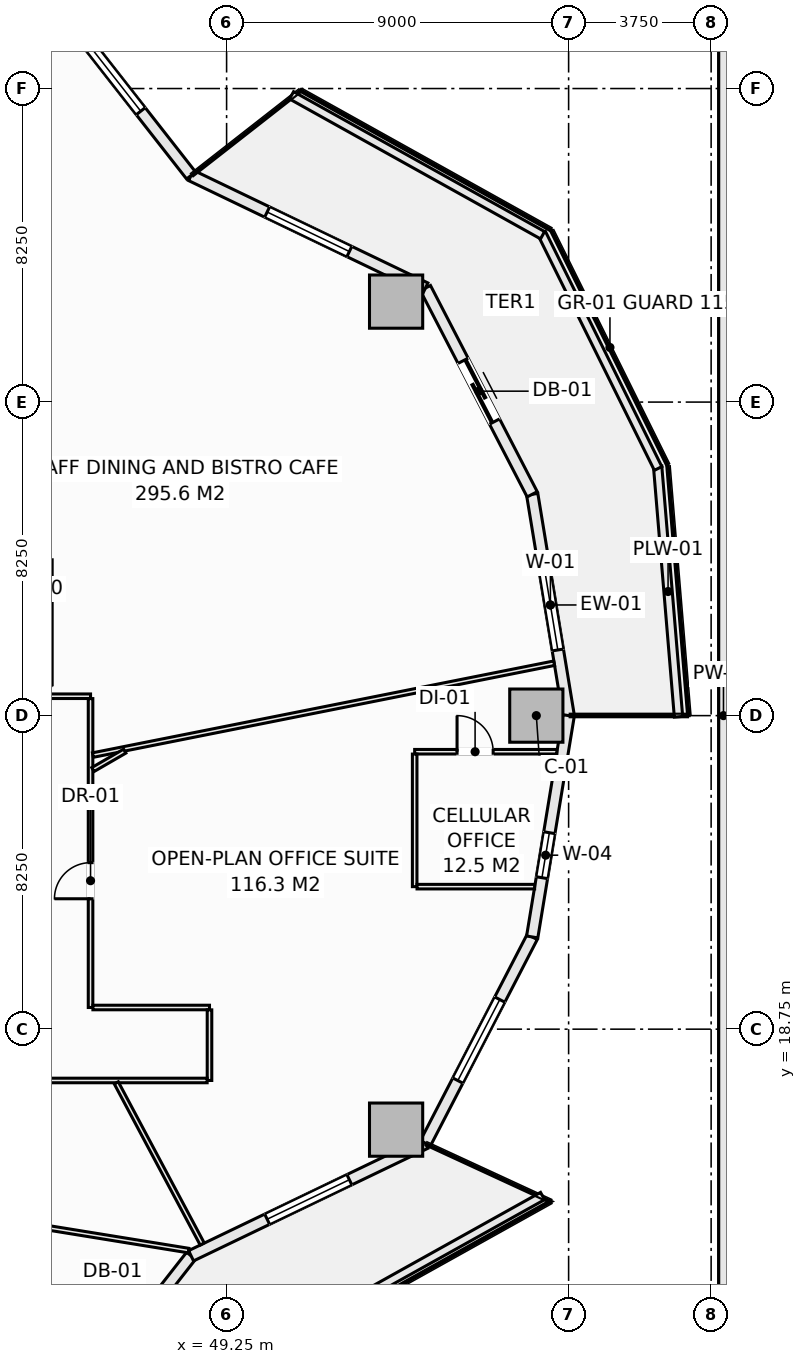
"""IFC4 building model, lengths in metres.
Left out: names, types, materials, properties, quantities, classifications, styles, units other than length and angle.
Written with IfcOpenShell. Run it as: python <this file> out.ifc"""

import sys

from ifc_helpers import new_model, si_unit, direction, frame, frame_2d, origin, origin_2d, place, context, subcontext, project, spatial, rectangle, extrude, element, fill, save


model = new_model("IFC4")
c1 = context("Model", 3, precision=1e-05, world=origin(), true_north=direction((0.0, 1.0)))
c2 = subcontext(c1, "Body", "Model", "MODEL_VIEW")
j1 = project(units=[si_unit("LENGTHUNIT", "METRE"), si_unit("PLANEANGLEUNIT", "RADIAN")], contexts=[c1])
p1 = place(None, origin())
s1 = spatial("IfcSite", under=j1, at=p1, CompositionType="ELEMENT")
p2 = place(p1, origin())
s2 = spatial("IfcBuilding", under=s1, at=p2, CompositionType="ELEMENT")
p3 = place(p2, frame((0.0, 0.0, 26.5)))
s3 = spatial("IfcBuildingStorey", under=s2, at=p3, CompositionType="ELEMENT", Elevation=26.5)
for number, where, z_axis, x_axis in (
    (1, (57.4, 27.0, -0.28), (0.0, 0.0, 1.0), (1.0, 0.0, 0.0)),
    (2, (53.71, 37.894, -0.28), (0.0, 0.0, 1.0), (1.0, 0.0, 0.0)),
    (3, (53.71, 16.106, -0.28), (0.0, 0.0, 1.0), (1.0, 0.0, 0.0)),
):
    element("IfcColumn", number, at=place(p3, frame(where, z_axis=z_axis, x_axis=x_axis)), inside=s3, PredefinedType="COLUMN", context=c2, shape_type="SweptSolid", body=[
        extrude(rectangle(XDim=1.4, YDim=1.4, at=origin_2d()), origin(), (0.0, 0.0, 1.0), 3.85),
    ])
p4 = place(p3, frame((57.292, 32.823, 0.0), z_axis=(0.0, 0.0, 1.0), x_axis=(0.162366057843, -0.98673059305, 0.0)))
e4 = element("IfcWall", 4, at=p4, inside=s3, PredefinedType="SOLIDWALL", context=c2, shape_type="SweptSolid", body=[
    extrude(rectangle(XDim=5.902, YDim=0.3, at=frame_2d((2.951, 0.0))), origin(), (0.0, 0.0, 1.0), 3.093),
])
p5 = place(p4, frame((1.751, 0.0, 0.85)))
e5 = element("IfcOpeningElement", 5, at=p5, cuts=e4, PredefinedType="OPENING", context=c2, shape_type="SweptSolid", body=[
    extrude(rectangle(XDim=2.4, YDim=1.9, at=frame_2d((1.2, 0.95))), frame((0.0, 0.16, 0.0), z_axis=(0.0, -1.0, 0.0), x_axis=(1.0, 0.0, 0.0)), (0.0, 0.0, 1.0), 0.32),
])
p6 = place(p3, frame((54.482, 38.25, 0.0), z_axis=(0.0, 0.0, 1.0), x_axis=(0.459809804413, -0.88801742312, 0.0)))
e6 = element("IfcWall", 6, at=p6, inside=s3, PredefinedType="SOLIDWALL", context=c2, shape_type="SweptSolid", body=[
    extrude(rectangle(XDim=6.111, YDim=0.3, at=frame_2d((3.055, 0.0))), origin(), (0.0, 0.0, 1.0), 3.093),
])
p7 = place(p6, frame((2.155, 0.0, 0.0)))
e7 = element("IfcOpeningElement", 7, at=p7, cuts=e6, PredefinedType="OPENING", context=c2, shape_type="SweptSolid", body=[
    extrude(rectangle(XDim=1.8, YDim=2.25, at=frame_2d((0.9, 1.125))), frame((0.0, 0.16, 0.0), z_axis=(0.0, -1.0, 0.0), x_axis=(1.0, 0.0, 0.0)), (0.0, 0.0, 1.0), 0.32),
])
p8 = place(p3, frame((48.315, 41.213, 0.0), z_axis=(0.0, 0.0, 1.0), x_axis=(0.901360393999, -0.433069786673, 0.0)))
e8 = element("IfcWall", 8, at=p8, inside=s3, PredefinedType="SOLIDWALL", context=c2, shape_type="SweptSolid", body=[
    extrude(rectangle(XDim=6.842, YDim=0.3, at=frame_2d((3.421, 0.0))), origin(), (0.0, 0.0, 1.0), 3.093),
])
p9 = place(p8, frame((2.221, 0.0, 0.85)))
e9 = element("IfcOpeningElement", 9, at=p9, cuts=e8, PredefinedType="OPENING", context=c2, shape_type="SweptSolid", body=[
    extrude(rectangle(XDim=2.4, YDim=1.9, at=frame_2d((1.2, 0.95))), frame((0.0, 0.16, 0.0), z_axis=(0.0, -1.0, 0.0), x_axis=(1.0, 0.0, 0.0)), (0.0, 0.0, 1.0), 0.32),
])
p10 = place(p3, frame((44.188, 46.486, 0.0), z_axis=(0.0, 0.0, 1.0), x_axis=(0.616421309777, -0.787416515482, 0.0)))
e10 = element("IfcWall", 10, at=p10, inside=s3, PredefinedType="SOLIDWALL", context=c2, shape_type="SweptSolid", body=[
    extrude(rectangle(XDim=6.696, YDim=0.3, at=frame_2d((3.348, 0.0))), origin(), (0.0, 0.0, 1.0), 3.093),
])
p11 = place(p10, frame((2.148, 0.0, 0.85)))
e11 = element("IfcOpeningElement", 11, at=p11, cuts=e10, PredefinedType="OPENING", context=c2, shape_type="SweptSolid", body=[
    extrude(rectangle(XDim=2.4, YDim=1.9, at=frame_2d((1.2, 0.95))), frame((0.0, 0.16, 0.0), z_axis=(0.0, -1.0, 0.0), x_axis=(1.0, 0.0, 0.0)), (0.0, 0.0, 1.0), 0.32),
])
p12 = place(p3, frame((44.188, 7.514, 0.0), z_axis=(0.0, 0.0, 1.0), x_axis=(0.616421309777, 0.787416515482, 0.0)))
e12 = element("IfcWall", 12, at=p12, inside=s3, PredefinedType="SOLIDWALL", context=c2, shape_type="SweptSolid", body=[
    extrude(rectangle(XDim=6.696, YDim=0.3, at=frame_2d((3.348, 0.0))), origin(), (0.0, 0.0, 1.0), 3.093),
])
p13 = place(p12, frame((2.448, 0.0, 0.0)))
e13 = element("IfcOpeningElement", 13, at=p13, cuts=e12, PredefinedType="OPENING", context=c2, shape_type="SweptSolid", body=[
    extrude(rectangle(XDim=1.8, YDim=2.25, at=frame_2d((0.9, 1.125))), frame((0.0, 0.16, 0.0), z_axis=(0.0, -1.0, 0.0), x_axis=(1.0, 0.0, 0.0)), (0.0, 0.0, 1.0), 0.32),
])
p14 = place(p3, frame((48.315, 12.787, 0.0), z_axis=(0.0, 0.0, 1.0), x_axis=(0.901360393999, 0.433069786673, 0.0)))
e14 = element("IfcWall", 14, at=p14, inside=s3, PredefinedType="SOLIDWALL", context=c2, shape_type="SweptSolid", body=[
    extrude(rectangle(XDim=6.842, YDim=0.3, at=frame_2d((3.421, 0.0))), origin(), (0.0, 0.0, 1.0), 3.093),
])
p15 = place(p14, frame((2.221, 0.0, 0.85)))
e15 = element("IfcOpeningElement", 15, at=p15, cuts=e14, PredefinedType="OPENING", context=c2, shape_type="SweptSolid", body=[
    extrude(rectangle(XDim=2.4, YDim=1.9, at=frame_2d((1.2, 0.95))), frame((0.0, 0.16, 0.0), z_axis=(0.0, -1.0, 0.0), x_axis=(1.0, 0.0, 0.0)), (0.0, 0.0, 1.0), 0.32),
])
p16 = place(p3, frame((54.482, 15.75, 0.0), z_axis=(0.0, 0.0, 1.0), x_axis=(0.459809804413, 0.88801742312, 0.0)))
e16 = element("IfcWall", 16, at=p16, inside=s3, PredefinedType="SOLIDWALL", context=c2, shape_type="SweptSolid", body=[
    extrude(rectangle(XDim=6.111, YDim=0.3, at=frame_2d((3.055, 0.0))), origin(), (0.0, 0.0, 1.0), 3.093),
])
p17 = place(p16, frame((1.855, 0.0, 0.85)))
e17 = element("IfcOpeningElement", 17, at=p17, cuts=e16, PredefinedType="OPENING", context=c2, shape_type="SweptSolid", body=[
    extrude(rectangle(XDim=2.4, YDim=1.9, at=frame_2d((1.2, 0.95))), frame((0.0, 0.16, 0.0), z_axis=(0.0, -1.0, 0.0), x_axis=(1.0, 0.0, 0.0)), (0.0, 0.0, 1.0), 0.32),
])
p18 = place(p3, frame((57.292, 21.177, 0.0), z_axis=(0.0, 0.0, 1.0), x_axis=(0.162366057843, 0.98673059305, 0.0)))
e18 = element("IfcWall", 18, at=p18, inside=s3, PredefinedType="SOLIDWALL", context=c2, shape_type="SweptSolid", body=[
    extrude(rectangle(XDim=5.902, YDim=0.3, at=frame_2d((2.951, 0.0))), origin(), (0.0, 0.0, 1.0), 3.093),
])
p19 = place(p18, frame((1.58, 0.0, 0.72)))
e19 = element("IfcOpeningElement", 19, at=p19, cuts=e18, PredefinedType="OPENING", context=c2, shape_type="SweptSolid", body=[
    extrude(rectangle(XDim=1.2, YDim=1.65, at=frame_2d((0.6, 0.825))), frame((0.0, 0.16, 0.0), z_axis=(0.0, -1.0, 0.0), x_axis=(1.0, 0.0, 0.0)), (0.0, 0.0, 1.0), 0.32),
])
p20 = place(p3, frame((60.592, 33.561, 0.0), z_axis=(0.0, 0.0, 1.0), x_axis=(0.08310047353, -0.996541173911, 0.0)))
e20 = element("IfcWall", 20, at=p20, inside=s3, PredefinedType="PARAPET", context=c2, shape_type="SweptSolid", body=[
    extrude(rectangle(XDim=6.613, YDim=0.22, at=frame_2d((3.307, 0.0))), origin(), (0.0, 0.0, 1.0), 0.52),
])
p21 = place(p3, frame((57.539, 39.697, 0.0), z_axis=(0.0, 0.0, 1.0), x_axis=(0.443578479433, -0.8962355341, 0.0)))
e21 = element("IfcWall", 21, at=p21, inside=s3, PredefinedType="PARAPET", context=c2, shape_type="SweptSolid", body=[
    extrude(rectangle(XDim=6.911, YDim=0.22, at=frame_2d((3.456, 0.0))), origin(), (0.0, 0.0, 1.0), 0.52),
])
for number, where, z_axis, x_axis in (
    (22, (50.959, 43.322, 0.0), (0.0, 0.0, 1.0), (0.874, -0.487, 0.0)),
    (23, (50.959, 10.678, 0.0), (0.0, 0.0, 1.0), (0.874, 0.487, 0.0)),
):
    element("IfcWall", number, at=place(p3, frame(where, z_axis=z_axis, x_axis=x_axis)), inside=s3, PredefinedType="PARAPET", context=c2, shape_type="SweptSolid", body=[
        extrude(rectangle(XDim=7.562, YDim=0.22, at=frame_2d((3.781, 0.0))), origin(), (0.0, 0.0, 1.0), 0.52),
    ])
p22 = place(p3, frame((62.325, 2.2, 0.0), z_axis=(0.0, 0.0, 1.0), x_axis=(0.0, 1.0, 0.0)))
e24 = element("IfcWall", 24, at=p22, inside=s3, PredefinedType="PARAPET", context=c2, shape_type="SweptSolid", body=[
    extrude(rectangle(XDim=49.6, YDim=0.25, at=frame_2d((24.8, 0.0))), origin(), (0.0, 0.0, 1.0), 1.15),
])
p23 = place(p3, frame((43.812, 27.51, 0.0), z_axis=(0.0, 0.0, 1.0), x_axis=(1.0, 0.0, 0.0)))
e25 = element("IfcWall", 25, at=p23, inside=s3, PredefinedType="PARTITIONING", context=c2, shape_type="SweptSolid", body=[
    extrude(rectangle(XDim=1.858, YDim=0.12, at=frame_2d((0.929, 0.0))), origin(), (0.0, 0.0, 1.0), 3.57),
])
p24 = place(p3, frame((45.67, 19.32, 0.0), z_axis=(0.0, 0.0, 1.0), x_axis=(0.0, 1.0, 0.0)))
e26 = element("IfcWall", 26, at=p24, inside=s3, PredefinedType="PARTITIONING", context=c2, shape_type="SweptSolid", body=[
    extrude(rectangle(XDim=8.128, YDim=0.12, at=frame_2d((4.064, 0.0))), origin(), (0.0, 0.0, 1.0), 3.57),
])
p25 = place(p24, frame((2.861, 0.0, 0.0)))
e27 = element("IfcOpeningElement", 27, at=p25, cuts=e26, PredefinedType="OPENING", context=c2, shape_type="SweptSolid", body=[
    extrude(rectangle(XDim=0.95, YDim=2.1, at=frame_2d((0.475, 1.05))), frame((0.0, 0.07, 0.0), z_axis=(0.0, -1.0, 0.0), x_axis=(1.0, 0.0, 0.0)), (0.0, 0.0, 1.0), 0.14),
])
p26 = place(p3, frame((45.732, 19.32, 0.0), z_axis=(0.0, 0.0, 1.0), x_axis=(1.0, 0.0, 0.0)))
e28 = element("IfcWall", 28, at=p26, inside=s3, PredefinedType="PARTITIONING", context=c2, shape_type="SweptSolid", body=[
    extrude(rectangle(XDim=3.068, YDim=0.12, at=frame_2d((1.534, 0.0))), origin(), (0.0, 0.0, 1.0), 3.205),
])
p27 = place(p3, frame((48.8, 17.4, 0.0), z_axis=(0.0, 0.0, 1.0), x_axis=(0.0, 1.0, 0.0)))
e29 = element("IfcWall", 29, at=p27, inside=s3, PredefinedType="PARTITIONING", context=c2, shape_type="SweptSolid", body=[
    extrude(rectangle(XDim=1.858, YDim=0.12, at=frame_2d((0.929, 0.0))), origin(), (0.0, 0.0, 1.0), 3.57),
])
p28 = place(p3, frame((43.812, 17.4, 0.0), z_axis=(0.0, 0.0, 1.0), x_axis=(1.0, 0.0, 0.0)))
e30 = element("IfcWall", 30, at=p28, inside=s3, PredefinedType="PARTITIONING", context=c2, shape_type="SweptSolid", body=[
    extrude(rectangle(XDim=4.926, YDim=0.12, at=frame_2d((2.463, 0.0))), origin(), (0.0, 0.0, 1.0), 3.57),
])
p29 = place(p3, frame((45.732, 25.962, 0.0), z_axis=(0.0, 0.0, 1.0), x_axis=(0.980745739886, 0.195289000445, 0.0)))
e31 = element("IfcWall", 31, at=p29, inside=s3, PredefinedType="PARTITIONING", context=c2, shape_type="SweptSolid", body=[
    extrude(rectangle(XDim=12.375, YDim=0.12, at=frame_2d((6.188, 0.0))), origin(), (0.0, 0.0, 1.0), 2.934),
])
p30 = place(p3, frame((45.732, 25.581, 0.0), z_axis=(0.0, 0.0, 1.0), x_axis=(0.865374506058, 0.501125697071, 0.0)))
e32 = element("IfcWall", 32, at=p30, inside=s3, PredefinedType="PARTITIONING", context=c2, shape_type="SweptSolid", body=[
    extrude(rectangle(XDim=0.969, YDim=0.12, at=frame_2d((0.484, 0.0))), origin(), (0.0, 0.0, 1.0), 3.57),
])
p31 = place(p3, frame((36.012, 14.908, 0.0), z_axis=(0.0, 0.0, 1.0), x_axis=(0.987115987943, -0.16000633221, 0.0)))
e33 = element("IfcWall", 33, at=p31, inside=s3, PredefinedType="PARTITIONING", context=c2, shape_type="SweptSolid", body=[
    extrude(rectangle(XDim=12.397, YDim=0.12, at=frame_2d((6.199, 0.0))), origin(), (0.0, 0.0, 1.0), 2.934),
])
p32 = place(p3, frame((46.347, 17.338, 0.0), z_axis=(0.0, 0.0, 1.0), x_axis=(0.470506505613, -0.882396525478, 0.0)))
e34 = element("IfcWall", 34, at=p32, inside=s3, PredefinedType="PARTITIONING", context=c2, shape_type="SweptSolid", body=[
    extrude(rectangle(XDim=4.806, YDim=0.12, at=frame_2d((2.403, 0.0))), origin(), (0.0, 0.0, 1.0), 3.57),
])
p33 = place(p3, frame((54.199, 26.05, 0.0), z_axis=(0.0, 0.0, 1.0), x_axis=(1.0, 0.0, 0.0)))
e35 = element("IfcWall", 35, at=p33, inside=s3, PredefinedType="PARTITIONING", context=c2, shape_type="SweptSolid", body=[
    extrude(rectangle(XDim=3.741, YDim=0.12, at=frame_2d((1.87, 0.0))), origin(), (0.0, 0.0, 1.0), 3.57),
])
p34 = place(p33, frame((1.115, 0.0, 0.0)))
e36 = element("IfcOpeningElement", 36, at=p34, cuts=e35, PredefinedType="OPENING", context=c2, shape_type="SweptSolid", body=[
    extrude(rectangle(XDim=0.95, YDim=2.1, at=frame_2d((0.475, 1.05))), frame((0.0, 0.07, 0.0), z_axis=(0.0, -1.0, 0.0), x_axis=(1.0, 0.0, 0.0)), (0.0, 0.0, 1.0), 0.14),
])
p35 = place(p3, frame((54.199, 22.5, 0.0), z_axis=(0.0, 0.0, 1.0), x_axis=(0.0, 1.0, 0.0)))
e37 = element("IfcWall", 37, at=p35, inside=s3, PredefinedType="PARTITIONING", context=c2, shape_type="SweptSolid", body=[
    extrude(rectangle(XDim=3.488, YDim=0.12, at=frame_2d((1.744, 0.0))), origin(), (0.0, 0.0, 1.0), 3.57),
])
p36 = place(p3, frame((54.261, 22.5, 0.0), z_axis=(0.0, 0.0, 1.0), x_axis=(1.0, 0.0, 0.0)))
e38 = element("IfcWall", 38, at=p36, inside=s3, PredefinedType="PARTITIONING", context=c2, shape_type="SweptSolid", body=[
    extrude(rectangle(XDim=3.094, YDim=0.12, at=frame_2d((1.547, 0.0))), origin(), (0.0, 0.0, 1.0), 3.57),
])
p37 = place(p5, origin())
e39 = element("IfcWindow", 39, at=p37, inside=s3, PartitioningType="SINGLE_PANEL", PredefinedType="WINDOW", context=c2, shape_type="SweptSolid", body=[
    extrude(rectangle(XDim=2.4, YDim=1.9, at=frame_2d((1.2, 0.95))), frame((0.0, 0.03, 0.0), z_axis=(0.0, -1.0, 0.0), x_axis=(1.0, 0.0, 0.0)), (0.0, 0.0, 1.0), 0.06),
])
fill(e5, e39)
p38 = place(p7, origin())
e40 = element("IfcDoor", 40, at=p38, inside=s3, OperationType="SLIDING_TO_LEFT", PredefinedType="DOOR", context=c2, shape_type="SweptSolid", body=[
    extrude(rectangle(XDim=1.8, YDim=2.25, at=frame_2d((0.9, 1.125))), frame((0.0, 0.025, 0.0), z_axis=(0.0, -1.0, 0.0), x_axis=(1.0, 0.0, 0.0)), (0.0, 0.0, 1.0), 0.05),
])
fill(e7, e40)
p39 = place(p9, origin())
e41 = element("IfcWindow", 41, at=p39, inside=s3, PartitioningType="SINGLE_PANEL", PredefinedType="WINDOW", context=c2, shape_type="SweptSolid", body=[
    extrude(rectangle(XDim=2.4, YDim=1.9, at=frame_2d((1.2, 0.95))), frame((0.0, 0.03, 0.0), z_axis=(0.0, -1.0, 0.0), x_axis=(1.0, 0.0, 0.0)), (0.0, 0.0, 1.0), 0.06),
])
fill(e9, e41)
p40 = place(p11, origin())
e42 = element("IfcWindow", 42, at=p40, inside=s3, PartitioningType="SINGLE_PANEL", PredefinedType="WINDOW", context=c2, shape_type="SweptSolid", body=[
    extrude(rectangle(XDim=2.4, YDim=1.9, at=frame_2d((1.2, 0.95))), frame((0.0, 0.03, 0.0), z_axis=(0.0, -1.0, 0.0), x_axis=(1.0, 0.0, 0.0)), (0.0, 0.0, 1.0), 0.06),
])
fill(e11, e42)
p41 = place(p15, origin())
e43 = element("IfcWindow", 43, at=p41, inside=s3, PartitioningType="SINGLE_PANEL", PredefinedType="WINDOW", context=c2, shape_type="SweptSolid", body=[
    extrude(rectangle(XDim=2.4, YDim=1.9, at=frame_2d((1.2, 0.95))), frame((0.0, 0.03, 0.0), z_axis=(0.0, -1.0, 0.0), x_axis=(1.0, 0.0, 0.0)), (0.0, 0.0, 1.0), 0.06),
])
fill(e15, e43)
p42 = place(p17, origin())
e44 = element("IfcWindow", 44, at=p42, inside=s3, PartitioningType="SINGLE_PANEL", PredefinedType="WINDOW", context=c2, shape_type="SweptSolid", body=[
    extrude(rectangle(XDim=2.4, YDim=1.9, at=frame_2d((1.2, 0.95))), frame((0.0, 0.03, 0.0), z_axis=(0.0, -1.0, 0.0), x_axis=(1.0, 0.0, 0.0)), (0.0, 0.0, 1.0), 0.06),
])
fill(e17, e44)
p43 = place(p19, origin())
e45 = element("IfcWindow", 45, at=p43, inside=s3, PartitioningType="SINGLE_PANEL", PredefinedType="WINDOW", context=c2, shape_type="SweptSolid", body=[
    extrude(rectangle(XDim=1.2, YDim=1.65, at=frame_2d((0.6, 0.825))), frame((0.0, 0.03, 0.0), z_axis=(0.0, -1.0, 0.0), x_axis=(1.0, 0.0, 0.0)), (0.0, 0.0, 1.0), 0.06),
])
fill(e19, e45)
p44 = place(p25, origin())
e46 = element("IfcDoor", 46, at=p44, inside=s3, OperationType="SINGLE_SWING_LEFT", PredefinedType="DOOR", context=c2, shape_type="SweptSolid", body=[
    extrude(rectangle(XDim=0.95, YDim=2.1, at=frame_2d((0.475, 1.05))), frame((0.0, 0.025, 0.0), z_axis=(0.0, -1.0, 0.0), x_axis=(1.0, 0.0, 0.0)), (0.0, 0.0, 1.0), 0.05),
])
fill(e27, e46)
p45 = place(p34, origin())
e47 = element("IfcDoor", 47, at=p45, inside=s3, OperationType="SINGLE_SWING_LEFT", PredefinedType="DOOR", context=c2, shape_type="SweptSolid", body=[
    extrude(rectangle(XDim=0.95, YDim=2.1, at=frame_2d((0.475, 1.05))), frame((0.0, 0.025, 0.0), z_axis=(0.0, -1.0, 0.0), x_axis=(1.0, 0.0, 0.0)), (0.0, 0.0, 1.0), 0.05),
])
fill(e36, e47)
save(model, sys.argv[1])
